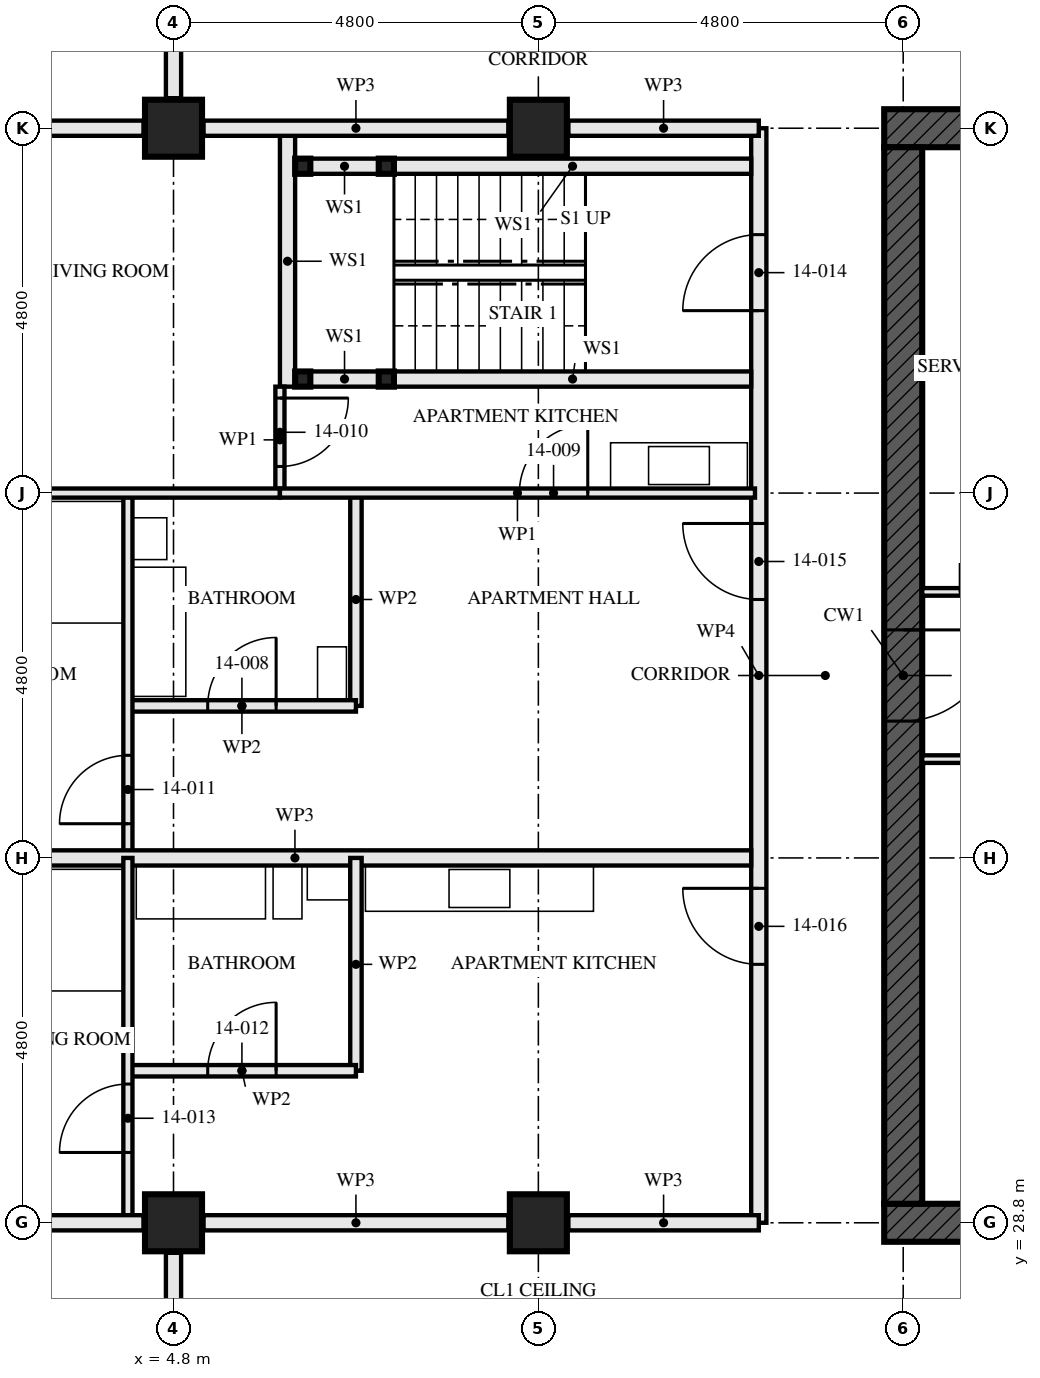
"""IFC4 building model, lengths in metres.
Left out: names, types, materials, properties, quantities, classifications, styles, units other than length and angle.
Written with IfcOpenShell. Run it as: python <this file> out.ifc"""

import sys

from ifc_helpers import new_model, si_unit, direction, frame, frame_2d, origin, origin_2d, place, context, subcontext, project, spatial, rectangle, hollow_rectangle, extrude, element, fill, save


model = new_model("IFC4")
c1 = context("Model", 3, precision=1e-05, world=origin(), true_north=direction((0.0, 1.0)))
c2 = subcontext(c1, "Body", "Model", "MODEL_VIEW")
j1 = project(units=[si_unit("LENGTHUNIT", "METRE"), si_unit("PLANEANGLEUNIT", "RADIAN")], contexts=[c1])
p1 = place(None, origin())
s1 = spatial("IfcSite", under=j1, at=p1, CompositionType="ELEMENT")
p2 = place(p1, origin())
s2 = spatial("IfcBuilding", under=s1, at=p2, CompositionType="ELEMENT")
p3 = place(p2, frame((0.0, 0.0, 55.0)))
s3 = spatial("IfcBuildingStorey", under=s2, at=p3, CompositionType="ELEMENT", Elevation=55.0)
for number, where, z_axis, x_axis in (
    (1, (4.8, 28.8, 0.0), (0.0, 0.0, 1.0), (0.0, 1.0, 0.0)),
    (2, (4.8, 43.2, 0.0), (0.0, 0.0, 1.0), (0.0, 1.0, 0.0)),
    (3, (9.6, 28.8, 0.0), (0.0, 0.0, 1.0), (0.0, 1.0, 0.0)),
    (4, (9.6, 43.2, 0.0), (0.0, 0.0, 1.0), (0.0, 1.0, 0.0)),
):
    element("IfcColumn", number, at=place(p3, frame(where, z_axis=z_axis, x_axis=x_axis)), inside=s3, PredefinedType="COLUMN", context=c2, shape_type="SweptSolid", body=[
        extrude(hollow_rectangle(XDim=0.75, YDim=0.75, WallThickness=0.08, at=origin_2d()), origin(), (0.0, 0.0, 1.0), 3.5),
    ])
p4 = place(p3, frame((14.15, 28.8, -0.17), z_axis=(0.0, 0.0, 1.0), x_axis=(1.0, 0.0, 0.0)))
e5 = element("IfcWall", 5, at=p4, inside=s3, PredefinedType="SHEAR", context=c2, shape_type="SweptSolid", body=[
    extrude(rectangle(XDim=14.9, YDim=0.5, at=frame_2d((7.45, 0.0))), origin(), (0.0, 0.0, 1.0), 3.5),
])
p5 = place(p4, frame((6.85, 0.0, 0.17)))
e6 = element("IfcOpeningElement", 6, at=p5, cuts=e5, PredefinedType="OPENING", context=c2, shape_type="SweptSolid", body=[
    extrude(rectangle(XDim=1.2, YDim=2.1, at=frame_2d((0.6, 1.05))), frame((0.0, 0.26, 0.0), z_axis=(0.0, -1.0, 0.0), x_axis=(1.0, 0.0, 0.0)), (0.0, 0.0, 1.0), 0.521),
])
p6 = place(p3, frame((29.05, 43.2, -0.17), z_axis=(0.0, 0.0, 1.0), x_axis=(-1.0, 0.0, 0.0)))
e7 = element("IfcWall", 7, at=p6, inside=s3, PredefinedType="SHEAR", context=c2, shape_type="SweptSolid", body=[
    extrude(rectangle(XDim=14.9, YDim=0.5, at=frame_2d((7.45, 0.0))), origin(), (0.0, 0.0, 1.0), 3.5),
])
p7 = place(p6, frame((6.85, 0.0, 0.17)))
e8 = element("IfcOpeningElement", 8, at=p7, cuts=e7, PredefinedType="OPENING", context=c2, shape_type="SweptSolid", body=[
    extrude(rectangle(XDim=1.2, YDim=2.1, at=frame_2d((0.6, 1.05))), frame((0.0, 0.26, 0.0), z_axis=(0.0, -1.0, 0.0), x_axis=(1.0, 0.0, 0.0)), (0.0, 0.0, 1.0), 0.521),
])
p8 = place(p3, frame((14.4, 42.95, -0.17), z_axis=(0.0, 0.0, 1.0), x_axis=(0.0, -1.0, 0.0)))
e9 = element("IfcWall", 9, at=p8, inside=s3, PredefinedType="SHEAR", context=c2, shape_type="SweptSolid", body=[
    extrude(rectangle(XDim=13.9, YDim=0.5, at=frame_2d((6.95, 0.0))), origin(), (0.0, 0.0, 1.0), 3.5),
])
p9 = place(p8, frame((6.35, 0.0, 0.17)))
e10 = element("IfcOpeningElement", 10, at=p9, cuts=e9, PredefinedType="OPENING", context=c2, shape_type="SweptSolid", body=[
    extrude(rectangle(XDim=1.2, YDim=2.1, at=frame_2d((0.6, 1.05))), frame((0.0, 0.26, 0.0), z_axis=(0.0, -1.0, 0.0), x_axis=(1.0, 0.0, 0.0)), (0.0, 0.0, 1.0), 0.521),
])
for number, where, z_axis, x_axis in (
    (11, (6.5, 42.7, 0.0), (0.0, 0.0, 1.0), (1.0, 0.0, 0.0)),
    (12, (6.5, 39.9, 0.0), (0.0, 0.0, 1.0), (1.0, 0.0, 0.0)),
    (13, (7.6, 42.7, 0.0), (0.0, 0.0, 1.0), (1.0, 0.0, 0.0)),
    (14, (7.6, 39.9, 0.0), (0.0, 0.0, 1.0), (1.0, 0.0, 0.0)),
):
    element("IfcColumn", number, at=place(p3, frame(where, z_axis=z_axis, x_axis=x_axis)), inside=s3, PredefinedType="COLUMN", context=c2, shape_type="SweptSolid", body=[
        extrude(hollow_rectangle(XDim=0.2, YDim=0.2, WallThickness=0.008, at=origin_2d()), origin(), (0.0, 0.0, 1.0), 3.33),
    ])
p10 = place(p3, frame((4.8, 26.8, 0.0), z_axis=(0.0, 0.0, 1.0), x_axis=(0.0, 1.0, 0.0)))
e15 = element("IfcWall", 15, at=p10, inside=s3, PredefinedType="PARTITIONING", context=c2, shape_type="SweptSolid", body=[
    extrude(rectangle(XDim=1.605, YDim=0.2, at=frame_2d((0.802, 0.0))), origin(), (0.0, 0.0, 1.0), 3.33),
])
p11 = place(p3, frame((6.6, 42.7, 0.0), z_axis=(0.0, 0.0, 1.0), x_axis=(1.0, 0.0, 0.0)))
e16 = element("IfcWall", 16, at=p11, inside=s3, PredefinedType="SOLIDWALL", context=c2, shape_type="SweptSolid", body=[
    extrude(rectangle(XDim=0.9, YDim=0.2, at=frame_2d((0.45, 0.0))), origin(), (0.0, 0.0, 1.0), 2.99),
])
p12 = place(p3, frame((7.7, 42.7, 0.0), z_axis=(0.0, 0.0, 1.0), x_axis=(1.0, 0.0, 0.0)))
e17 = element("IfcWall", 17, at=p12, inside=s3, PredefinedType="SOLIDWALL", context=c2, shape_type="SweptSolid", body=[
    extrude(rectangle(XDim=4.7, YDim=0.2, at=frame_2d((2.35, 0.0))), origin(), (0.0, 0.0, 1.0), 2.99),
])
p13 = place(p3, frame((6.6, 39.9, 0.0), z_axis=(0.0, 0.0, 1.0), x_axis=(1.0, 0.0, 0.0)))
e18 = element("IfcWall", 18, at=p13, inside=s3, PredefinedType="SOLIDWALL", context=c2, shape_type="SweptSolid", body=[
    extrude(rectangle(XDim=0.9, YDim=0.2, at=frame_2d((0.45, 0.0))), origin(), (0.0, 0.0, 1.0), 2.99),
])
p14 = place(p3, frame((7.7, 39.9, 0.0), z_axis=(0.0, 0.0, 1.0), x_axis=(1.0, 0.0, 0.0)))
e19 = element("IfcWall", 19, at=p14, inside=s3, PredefinedType="SOLIDWALL", context=c2, shape_type="SweptSolid", body=[
    extrude(rectangle(XDim=4.7, YDim=0.2, at=frame_2d((2.35, 0.0))), origin(), (0.0, 0.0, 1.0), 2.99),
])
p15 = place(p3, frame((6.3, 43.1, 0.0), z_axis=(0.0, 0.0, 1.0), x_axis=(0.0, -1.0, 0.0)))
e20 = element("IfcWall", 20, at=p15, inside=s3, PredefinedType="SOLIDWALL", context=c2, shape_type="SweptSolid", body=[
    extrude(rectangle(XDim=3.3, YDim=0.2, at=frame_2d((1.65, 0.0))), origin(), (0.0, 0.0, 1.0), 3.33),
])
p16 = place(p3, frame((4.2, 35.6, 0.0), z_axis=(0.0, 0.0, 1.0), x_axis=(1.0, 0.0, 0.0)))
e21 = element("IfcWall", 21, at=p16, inside=s3, PredefinedType="PARTITIONING", context=c2, shape_type="SweptSolid", body=[
    extrude(rectangle(XDim=3.0, YDim=0.15, at=frame_2d((1.5, 0.0))), origin(), (0.0, 0.0, 1.0), 3.33),
])
p17 = place(p16, frame((1.05, 0.0, 0.0)))
e22 = element("IfcOpeningElement", 22, at=p17, cuts=e21, PredefinedType="OPENING", context=c2, shape_type="SweptSolid", body=[
    extrude(rectangle(XDim=0.9, YDim=2.1, at=frame_2d((0.45, 1.05))), frame((0.0, 0.085, 0.0), z_axis=(0.0, -1.0, 0.0), x_axis=(1.0, 0.0, 0.0)), (0.0, 0.0, 1.0), 0.171),
])
p18 = place(p3, frame((7.2, 38.4, 0.0), z_axis=(0.0, 0.0, 1.0), x_axis=(0.0, -1.0, 0.0)))
e23 = element("IfcWall", 23, at=p18, inside=s3, PredefinedType="PARTITIONING", context=c2, shape_type="SweptSolid", body=[
    extrude(rectangle(XDim=2.8, YDim=0.15, at=frame_2d((1.4, 0.0))), origin(), (0.0, 0.0, 1.0), 3.33),
])
p19 = place(p3, frame((6.2, 38.4, 0.0), z_axis=(0.0, 0.0, 1.0), x_axis=(1.0, 0.0, 0.0)))
e24 = element("IfcWall", 24, at=p19, inside=s3, PredefinedType="PARTITIONING", context=c2, shape_type="SweptSolid", body=[
    extrude(rectangle(XDim=6.25, YDim=0.12, at=frame_2d((3.125, 0.0))), origin(), (0.0, 0.0, 1.0), 2.55),
])
p20 = place(p19, frame((3.15, 0.0, 0.0)))
e25 = element("IfcOpeningElement", 25, at=p20, cuts=e24, PredefinedType="OPENING", context=c2, shape_type="SweptSolid", body=[
    extrude(rectangle(XDim=0.9, YDim=2.1, at=frame_2d((0.45, 1.05))), frame((0.0, 0.071, 0.0), z_axis=(0.0, -1.0, 0.0), x_axis=(1.0, 0.0, 0.0)), (0.0, 0.0, 1.0), 0.141),
])
p21 = place(p3, frame((6.2, 39.8, 0.0), z_axis=(0.0, 0.0, 1.0), x_axis=(0.0, -1.0, 0.0)))
e26 = element("IfcWall", 26, at=p21, inside=s3, PredefinedType="PARTITIONING", context=c2, shape_type="SweptSolid", body=[
    extrude(rectangle(XDim=1.4, YDim=0.12, at=frame_2d((0.7, 0.0))), origin(), (0.0, 0.0, 1.0), 3.33),
])
p22 = place(p21, frame((0.15, 0.0, 0.0)))
e27 = element("IfcOpeningElement", 27, at=p22, cuts=e26, PredefinedType="OPENING", context=c2, shape_type="SweptSolid", body=[
    extrude(rectangle(XDim=0.9, YDim=2.1, at=frame_2d((0.45, 1.05))), frame((0.0, 0.071, 0.0), z_axis=(0.0, -1.0, 0.0), x_axis=(1.0, 0.0, 0.0)), (0.0, 0.0, 1.0), 0.141),
])
p23 = place(p3, frame((4.2, 38.4, 0.0), z_axis=(0.0, 0.0, 1.0), x_axis=(0.0, -1.0, 0.0)))
e28 = element("IfcWall", 28, at=p23, inside=s3, PredefinedType="PARTITIONING", context=c2, shape_type="SweptSolid", body=[
    extrude(rectangle(XDim=4.8, YDim=0.12, at=frame_2d((2.4, 0.0))), origin(), (0.0, 0.0, 1.0), 3.33),
])
p24 = place(p23, frame((3.45, 0.0, 0.0)))
e29 = element("IfcOpeningElement", 29, at=p24, cuts=e28, PredefinedType="OPENING", context=c2, shape_type="SweptSolid", body=[
    extrude(rectangle(XDim=0.9, YDim=2.1, at=frame_2d((0.45, 1.05))), frame((0.0, 0.071, 0.0), z_axis=(0.0, -1.0, 0.0), x_axis=(1.0, 0.0, 0.0)), (0.0, 0.0, 1.0), 0.141),
])
p25 = place(p3, frame((0.395, 38.4, 0.0), z_axis=(0.0, 0.0, 1.0), x_axis=(1.0, 0.0, 0.0)))
e30 = element("IfcWall", 30, at=p25, inside=s3, PredefinedType="PARTITIONING", context=c2, shape_type="SweptSolid", body=[
    extrude(rectangle(XDim=5.805, YDim=0.12, at=frame_2d((2.902, 0.0))), origin(), (0.0, 0.0, 1.0), 2.55),
])
p26 = place(p3, frame((0.395, 33.6, 0.0), z_axis=(0.0, 0.0, 1.0), x_axis=(1.0, 0.0, 0.0)))
e31 = element("IfcWall", 31, at=p26, inside=s3, PredefinedType="PARTITIONING", context=c2, shape_type="SweptSolid", body=[
    extrude(rectangle(XDim=12.005, YDim=0.2, at=frame_2d((6.002, 0.0))), origin(), (0.0, 0.0, 1.0), 2.55),
])
p27 = place(p3, frame((4.2, 30.8, 0.0), z_axis=(0.0, 0.0, 1.0), x_axis=(1.0, 0.0, 0.0)))
e32 = element("IfcWall", 32, at=p27, inside=s3, PredefinedType="PARTITIONING", context=c2, shape_type="SweptSolid", body=[
    extrude(rectangle(XDim=3.0, YDim=0.15, at=frame_2d((1.5, 0.0))), origin(), (0.0, 0.0, 1.0), 3.33),
])
p28 = place(p27, frame((1.05, 0.0, 0.0)))
e33 = element("IfcOpeningElement", 33, at=p28, cuts=e32, PredefinedType="OPENING", context=c2, shape_type="SweptSolid", body=[
    extrude(rectangle(XDim=0.9, YDim=2.1, at=frame_2d((0.45, 1.05))), frame((0.0, 0.085, 0.0), z_axis=(0.0, -1.0, 0.0), x_axis=(1.0, 0.0, 0.0)), (0.0, 0.0, 1.0), 0.171),
])
p29 = place(p3, frame((7.2, 33.6, 0.0), z_axis=(0.0, 0.0, 1.0), x_axis=(0.0, -1.0, 0.0)))
e34 = element("IfcWall", 34, at=p29, inside=s3, PredefinedType="PARTITIONING", context=c2, shape_type="SweptSolid", body=[
    extrude(rectangle(XDim=2.8, YDim=0.15, at=frame_2d((1.4, 0.0))), origin(), (0.0, 0.0, 1.0), 3.33),
])
p30 = place(p3, frame((4.2, 33.6, 0.0), z_axis=(0.0, 0.0, 1.0), x_axis=(0.0, -1.0, 0.0)))
e35 = element("IfcWall", 35, at=p30, inside=s3, PredefinedType="PARTITIONING", context=c2, shape_type="SweptSolid", body=[
    extrude(rectangle(XDim=4.8, YDim=0.12, at=frame_2d((2.4, 0.0))), origin(), (0.0, 0.0, 1.0), 3.33),
])
p31 = place(p30, frame((2.975, 0.0, 0.0)))
e36 = element("IfcOpeningElement", 36, at=p31, cuts=e35, PredefinedType="OPENING", context=c2, shape_type="SweptSolid", body=[
    extrude(rectangle(XDim=0.9, YDim=2.1, at=frame_2d((0.45, 1.05))), frame((0.0, 0.071, 0.0), z_axis=(0.0, -1.0, 0.0), x_axis=(1.0, 0.0, 0.0)), (0.0, 0.0, 1.0), 0.141),
])
p32 = place(p3, frame((12.5, 43.2, 0.0), z_axis=(0.0, 0.0, 1.0), x_axis=(0.0, -1.0, 0.0)))
e37 = element("IfcWall", 37, at=p32, inside=s3, PredefinedType="PARTITIONING", context=c2, shape_type="SweptSolid", body=[
    extrude(rectangle(XDim=14.4, YDim=0.2, at=frame_2d((7.2, 0.0))), origin(), (0.0, 0.0, 1.0), 2.55),
])
p33 = place(p32, frame((1.4, 0.0, 0.0)))
e38 = element("IfcOpeningElement", 38, at=p33, cuts=e37, PredefinedType="OPENING", context=c2, shape_type="SweptSolid", body=[
    extrude(rectangle(XDim=1.0, YDim=2.1, at=frame_2d((0.5, 1.05))), frame((0.0, 0.111, 0.0), z_axis=(0.0, -1.0, 0.0), x_axis=(1.0, 0.0, 0.0)), (0.0, 0.0, 1.0), 0.221),
])
p34 = place(p32, frame((5.2, 0.0, 0.0)))
e39 = element("IfcOpeningElement", 39, at=p34, cuts=e37, PredefinedType="OPENING", context=c2, shape_type="SweptSolid", body=[
    extrude(rectangle(XDim=1.0, YDim=2.1, at=frame_2d((0.5, 1.05))), frame((0.0, 0.111, 0.0), z_axis=(0.0, -1.0, 0.0), x_axis=(1.0, 0.0, 0.0)), (0.0, 0.0, 1.0), 0.221),
])
p35 = place(p32, frame((10.0, 0.0, 0.0)))
e40 = element("IfcOpeningElement", 40, at=p35, cuts=e37, PredefinedType="OPENING", context=c2, shape_type="SweptSolid", body=[
    extrude(rectangle(XDim=1.0, YDim=2.1, at=frame_2d((0.5, 1.05))), frame((0.0, 0.111, 0.0), z_axis=(0.0, -1.0, 0.0), x_axis=(1.0, 0.0, 0.0)), (0.0, 0.0, 1.0), 0.221),
])
p36 = place(p3, frame((4.8, 45.2, 0.0), z_axis=(0.0, 0.0, 1.0), x_axis=(0.0, -1.0, 0.0)))
e41 = element("IfcWall", 41, at=p36, inside=s3, PredefinedType="PARTITIONING", context=c2, shape_type="SweptSolid", body=[
    extrude(rectangle(XDim=1.605, YDim=0.2, at=frame_2d((0.802, 0.0))), origin(), (0.0, 0.0, 1.0), 3.33),
])
p37 = place(p3, frame((14.65, 34.9, 0.0), z_axis=(0.0, 0.0, 1.0), x_axis=(1.0, 0.0, 0.0)))
e42 = element("IfcWall", 42, at=p37, inside=s3, PredefinedType="SOLIDWALL", context=c2, shape_type="SweptSolid", body=[
    extrude(rectangle(XDim=5.9, YDim=0.1, at=frame_2d((2.95, 0.0))), origin(), (0.0, 0.0, 1.0), 3.33),
])
p38 = place(p37, frame((1.6, 0.0, 0.0)))
e43 = element("IfcOpeningElement", 43, at=p38, cuts=e42, PredefinedType="OPENING", context=c2, shape_type="SweptSolid", body=[
    extrude(rectangle(XDim=0.7, YDim=2.1, at=frame_2d((0.35, 1.05))), frame((0.0, 0.061, 0.0), z_axis=(0.0, -1.0, 0.0), x_axis=(1.0, 0.0, 0.0)), (0.0, 0.0, 1.0), 0.121),
])
p39 = place(p3, frame((14.65, 37.1, 0.0), z_axis=(0.0, 0.0, 1.0), x_axis=(1.0, 0.0, 0.0)))
e44 = element("IfcWall", 44, at=p39, inside=s3, PredefinedType="SOLIDWALL", context=c2, shape_type="SweptSolid", body=[
    extrude(rectangle(XDim=5.9, YDim=0.1, at=frame_2d((2.95, 0.0))), origin(), (0.0, 0.0, 1.0), 3.33),
])
p40 = place(p39, frame((0.5, 0.0, 0.0)))
e45 = element("IfcOpeningElement", 45, at=p40, cuts=e44, PredefinedType="OPENING", context=c2, shape_type="SweptSolid", body=[
    extrude(rectangle(XDim=0.7, YDim=2.1, at=frame_2d((0.35, 1.05))), frame((0.0, 0.061, 0.0), z_axis=(0.0, -1.0, 0.0), x_axis=(1.0, 0.0, 0.0)), (0.0, 0.0, 1.0), 0.121),
])
p41 = place(p39, frame((1.85, 0.0, 0.0)))
e46 = element("IfcOpeningElement", 46, at=p41, cuts=e44, PredefinedType="OPENING", context=c2, shape_type="SweptSolid", body=[
    extrude(rectangle(XDim=0.9, YDim=2.1, at=frame_2d((0.45, 1.05))), frame((0.0, 0.061, 0.0), z_axis=(0.0, -1.0, 0.0), x_axis=(1.0, 0.0, 0.0)), (0.0, 0.0, 1.0), 0.121),
])
p42 = place(p3, frame((12.5, 28.8, 0.0), z_axis=(0.0, 0.0, 1.0), x_axis=(-1.0, 0.0, 0.0)))
e47 = element("IfcWall", 47, at=p42, inside=s3, PredefinedType="PARTITIONING", context=c2, shape_type="SweptSolid", body=[
    extrude(rectangle(XDim=2.505, YDim=0.2, at=frame_2d((1.252, 0.0))), origin(), (0.0, 0.0, 1.0), 2.32),
])
p43 = place(p3, frame((9.205, 28.8, 0.0), z_axis=(0.0, 0.0, 1.0), x_axis=(-1.0, 0.0, 0.0)))
e48 = element("IfcWall", 48, at=p43, inside=s3, PredefinedType="PARTITIONING", context=c2, shape_type="SweptSolid", body=[
    extrude(rectangle(XDim=4.01, YDim=0.2, at=frame_2d((2.005, 0.0))), origin(), (0.0, 0.0, 1.0), 2.32),
])
p44 = place(p3, frame((4.405, 28.8, 0.0), z_axis=(0.0, 0.0, 1.0), x_axis=(-1.0, 0.0, 0.0)))
e49 = element("IfcWall", 49, at=p44, inside=s3, PredefinedType="PARTITIONING", context=c2, shape_type="SweptSolid", body=[
    extrude(rectangle(XDim=4.11, YDim=0.2, at=frame_2d((2.055, 0.0))), origin(), (0.0, 0.0, 1.0), 2.32),
])
p45 = place(p3, frame((12.5, 43.2, 0.0), z_axis=(0.0, 0.0, 1.0), x_axis=(-1.0, 0.0, 0.0)))
e50 = element("IfcWall", 50, at=p45, inside=s3, PredefinedType="PARTITIONING", context=c2, shape_type="SweptSolid", body=[
    extrude(rectangle(XDim=2.505, YDim=0.2, at=frame_2d((1.252, 0.0))), origin(), (0.0, 0.0, 1.0), 2.32),
])
p46 = place(p3, frame((9.205, 43.2, 0.0), z_axis=(0.0, 0.0, 1.0), x_axis=(-1.0, 0.0, 0.0)))
e51 = element("IfcWall", 51, at=p46, inside=s3, PredefinedType="PARTITIONING", context=c2, shape_type="SweptSolid", body=[
    extrude(rectangle(XDim=4.01, YDim=0.2, at=frame_2d((2.005, 0.0))), origin(), (0.0, 0.0, 1.0), 2.32),
])
p47 = place(p3, frame((4.405, 43.2, 0.0), z_axis=(0.0, 0.0, 1.0), x_axis=(-1.0, 0.0, 0.0)))
e52 = element("IfcWall", 52, at=p47, inside=s3, PredefinedType="PARTITIONING", context=c2, shape_type="SweptSolid", body=[
    extrude(rectangle(XDim=4.085, YDim=0.2, at=frame_2d((2.042, 0.0))), origin(), (0.0, 0.0, 1.0), 2.32),
])
p48 = place(p17, origin())
e53 = element("IfcDoor", 53, at=p48, inside=s3, OperationType="SINGLE_SWING_LEFT", PredefinedType="DOOR", context=c2, shape_type="SweptSolid", body=[
    extrude(rectangle(XDim=0.9, YDim=2.1, at=frame_2d((0.45, 1.05))), frame((0.0, 0.022, 0.0), z_axis=(0.0, -1.0, 0.0), x_axis=(1.0, 0.0, 0.0)), (0.0, 0.0, 1.0), 0.044),
])
fill(e22, e53)
p49 = place(p20, origin())
e54 = element("IfcDoor", 54, at=p49, inside=s3, OperationType="SINGLE_SWING_LEFT", PredefinedType="DOOR", context=c2, shape_type="SweptSolid", body=[
    extrude(rectangle(XDim=0.9, YDim=2.1, at=frame_2d((0.45, 1.05))), frame((0.0, 0.022, 0.0), z_axis=(0.0, -1.0, 0.0), x_axis=(1.0, 0.0, 0.0)), (0.0, 0.0, 1.0), 0.044),
])
fill(e25, e54)
p50 = place(p22, origin())
e55 = element("IfcDoor", 55, at=p50, inside=s3, OperationType="SINGLE_SWING_RIGHT", PredefinedType="DOOR", context=c2, shape_type="SweptSolid", body=[
    extrude(rectangle(XDim=0.9, YDim=2.1, at=frame_2d((0.45, 1.05))), frame((0.0, 0.022, 0.0), z_axis=(0.0, -1.0, 0.0), x_axis=(1.0, 0.0, 0.0)), (0.0, 0.0, 1.0), 0.044),
])
fill(e27, e55)
p51 = place(p24, frame((0.9, 0.0, 0.0), z_axis=(0.0, 0.0, 1.0), x_axis=(-1.0, 0.0, 0.0)))
e56 = element("IfcDoor", 56, at=p51, inside=s3, OperationType="SINGLE_SWING_RIGHT", PredefinedType="DOOR", context=c2, shape_type="SweptSolid", body=[
    extrude(rectangle(XDim=0.9, YDim=2.1, at=frame_2d((0.45, 1.05))), frame((0.0, 0.022, 0.0), z_axis=(0.0, -1.0, 0.0), x_axis=(1.0, 0.0, 0.0)), (0.0, 0.0, 1.0), 0.044),
])
fill(e29, e56)
p52 = place(p28, origin())
e57 = element("IfcDoor", 57, at=p52, inside=s3, OperationType="SINGLE_SWING_LEFT", PredefinedType="DOOR", context=c2, shape_type="SweptSolid", body=[
    extrude(rectangle(XDim=0.9, YDim=2.1, at=frame_2d((0.45, 1.05))), frame((0.0, 0.022, 0.0), z_axis=(0.0, -1.0, 0.0), x_axis=(1.0, 0.0, 0.0)), (0.0, 0.0, 1.0), 0.044),
])
fill(e33, e57)
p53 = place(p31, frame((0.9, 0.0, 0.0), z_axis=(0.0, 0.0, 1.0), x_axis=(-1.0, 0.0, 0.0)))
e58 = element("IfcDoor", 58, at=p53, inside=s3, OperationType="SINGLE_SWING_RIGHT", PredefinedType="DOOR", context=c2, shape_type="SweptSolid", body=[
    extrude(rectangle(XDim=0.9, YDim=2.1, at=frame_2d((0.45, 1.05))), frame((0.0, 0.022, 0.0), z_axis=(0.0, -1.0, 0.0), x_axis=(1.0, 0.0, 0.0)), (0.0, 0.0, 1.0), 0.044),
])
fill(e36, e58)
p54 = place(p33, frame((1.0, 0.0, 0.0), z_axis=(0.0, 0.0, 1.0), x_axis=(-1.0, 0.0, 0.0)))
e59 = element("IfcDoor", 59, at=p54, inside=s3, OperationType="SINGLE_SWING_RIGHT", PredefinedType="DOOR", context=c2, shape_type="SweptSolid", body=[
    extrude(rectangle(XDim=1.0, YDim=2.1, at=frame_2d((0.5, 1.05))), frame((0.0, 0.032, 0.0), z_axis=(0.0, -1.0, 0.0), x_axis=(1.0, 0.0, 0.0)), (0.0, 0.0, 1.0), 0.064),
])
fill(e38, e59)
p55 = place(p34, frame((1.0, 0.0, 0.0), z_axis=(0.0, 0.0, 1.0), x_axis=(-1.0, 0.0, 0.0)))
e60 = element("IfcDoor", 60, at=p55, inside=s3, OperationType="SINGLE_SWING_LEFT", PredefinedType="DOOR", context=c2, shape_type="SweptSolid", body=[
    extrude(rectangle(XDim=1.0, YDim=2.1, at=frame_2d((0.5, 1.05))), frame((0.0, 0.027, 0.0), z_axis=(0.0, -1.0, 0.0), x_axis=(1.0, 0.0, 0.0)), (0.0, 0.0, 1.0), 0.054),
])
fill(e39, e60)
p56 = place(p35, frame((1.0, 0.0, 0.0), z_axis=(0.0, 0.0, 1.0), x_axis=(-1.0, 0.0, 0.0)))
e61 = element("IfcDoor", 61, at=p56, inside=s3, OperationType="SINGLE_SWING_LEFT", PredefinedType="DOOR", context=c2, shape_type="SweptSolid", body=[
    extrude(rectangle(XDim=1.0, YDim=2.1, at=frame_2d((0.5, 1.05))), frame((0.0, 0.027, 0.0), z_axis=(0.0, -1.0, 0.0), x_axis=(1.0, 0.0, 0.0)), (0.0, 0.0, 1.0), 0.054),
])
fill(e40, e61)
p57 = place(p9, origin())
e62 = element("IfcDoor", 62, at=p57, inside=s3, OperationType="SINGLE_SWING_LEFT", PredefinedType="DOOR", context=c2, shape_type="SweptSolid", body=[
    extrude(rectangle(XDim=1.2, YDim=2.1, at=frame_2d((0.6, 1.05))), frame((0.0, 0.027, 0.0), z_axis=(0.0, -1.0, 0.0), x_axis=(1.0, 0.0, 0.0)), (0.0, 0.0, 1.0), 0.054),
])
fill(e10, e62)
save(model, sys.argv[1])
